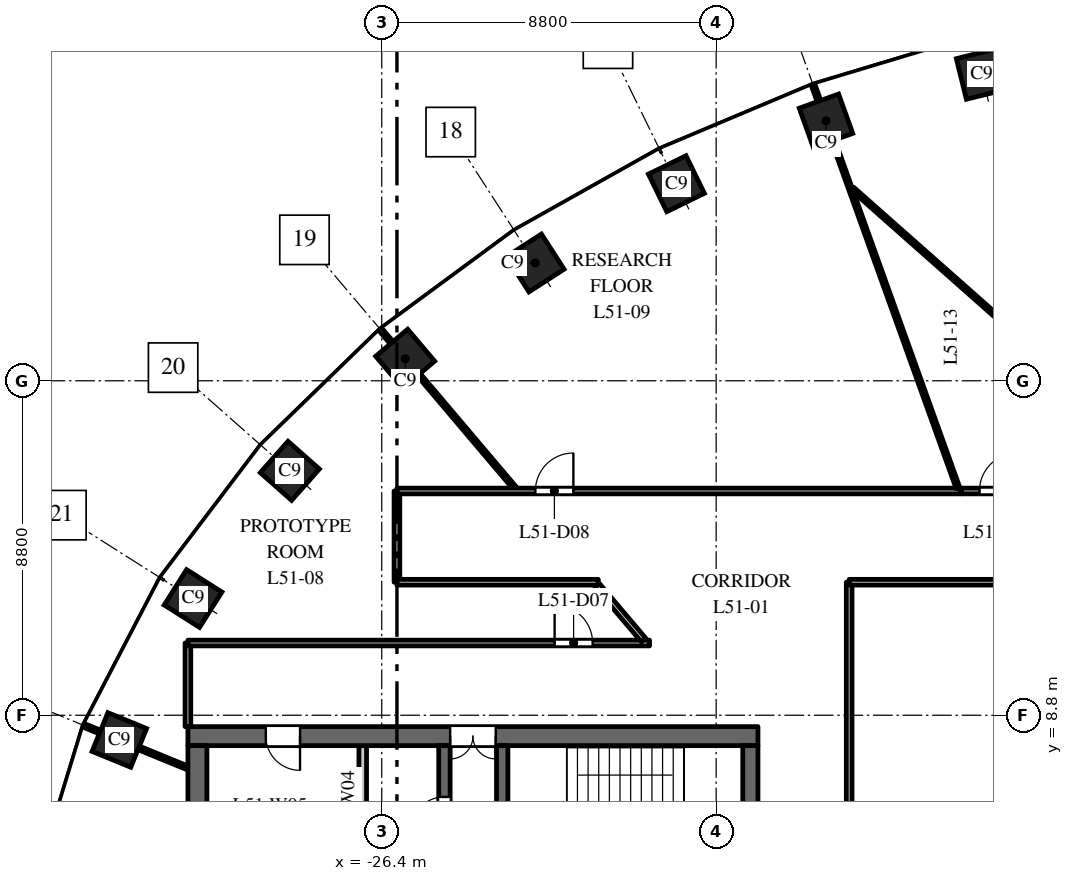
"""IFC4 building model, lengths in metres.
Left out: names, types, materials, properties, quantities, classifications, styles, units other than length and angle.
Written with IfcOpenShell. Run it as: python <this file> out.ifc"""

import sys

from ifc_helpers import new_model, si_unit, direction, frame, frame_2d, origin, origin_2d, place, context, subcontext, project, spatial, rectangle, extrude, element, fill, save


model = new_model("IFC4")
c1 = context("Model", 3, precision=1e-05, world=origin(), true_north=direction((0.0, 1.0)))
c2 = subcontext(c1, "Body", "Model", "MODEL_VIEW")
j1 = project(units=[si_unit("LENGTHUNIT", "METRE"), si_unit("PLANEANGLEUNIT", "RADIAN")], contexts=[c1])
p1 = place(None, origin())
s1 = spatial("IfcSite", under=j1, at=p1, CompositionType="ELEMENT")
p2 = place(p1, origin())
s2 = spatial("IfcBuilding", under=s1, at=p2, CompositionType="ELEMENT")
p3 = place(p2, frame((0.0, 0.0, 245.5)))
s3 = spatial("IfcBuildingStorey", under=s2, at=p3, CompositionType="ELEMENT", Elevation=245.5)
for number, where, z_axis, x_axis in (
    (1, (-10.613, 25.674, 0.0), (0.0, 0.0, 1.0), (-0.971, -0.24, 0.0)),
    (2, (-14.709, 24.441, 0.0), (0.0, 0.0, 1.0), (-0.941, -0.338, 0.0)),
    (3, (-18.646, 22.785, 0.0), (0.0, 0.0, 1.0), (-0.898, -0.439, 0.0)),
    (4, (-22.362, 20.7, 0.0), (0.0, 0.0, 1.0), (-0.84, -0.542, 0.0)),
    (5, (-25.783, 18.18, 0.0), (0.0, 0.0, 1.0), (-0.763, -0.646, 0.0)),
    (6, (-28.819, 15.23, 0.0), (0.0, 0.0, 1.0), (-0.663, -0.749, 0.0)),
    (7, (-31.365, 11.871, 0.0), (0.0, 0.0, 1.0), (-0.535, -0.845, 0.0)),
    (8, (-33.305, 8.149, 0.0), (0.0, 0.0, 1.0), (-0.379, -0.925, 0.0)),
):
    element("IfcColumn", number, at=place(p3, frame(where, z_axis=z_axis, x_axis=x_axis)), inside=s3, PredefinedType="COLUMN", context=c2, shape_type="SweptSolid", body=[
        extrude(rectangle(XDim=1.1, YDim=1.1, at=origin_2d()), origin(), (0.0, 0.0, 1.0), 4.0),
    ])
p4 = place(p3, frame((-16.5, 8.25, 0.0), z_axis=(0.0, 0.0, 1.0), x_axis=(-1.0, 0.0, 0.0)))
e9 = element("IfcWall", 9, at=p4, inside=s3, PredefinedType="SHEAR", context=c2, shape_type="SweptSolid", body=[
    extrude(rectangle(XDim=15.0, YDim=0.5, at=frame_2d((7.5, 0.0))), origin(), (0.0, 0.0, 1.0), 3.7),
])
p5 = place(p4, frame((6.9, 0.0, 0.0)))
e10 = element("IfcOpeningElement", 10, at=p5, cuts=e9, PredefinedType="OPENING", context=c2, shape_type="SweptSolid", body=[
    extrude(rectangle(XDim=1.2, YDim=2.1, at=frame_2d((0.6, 1.05))), frame((0.0, 0.26, 0.0), z_axis=(0.0, -1.0, 0.0), x_axis=(1.0, 0.0, 0.0)), (0.0, 0.0, 1.0), 0.52),
])
p6 = place(p4, frame((12.05, 0.0, 0.0)))
e11 = element("IfcOpeningElement", 11, at=p6, cuts=e9, PredefinedType="OPENING", context=c2, shape_type="SweptSolid", body=[
    extrude(rectangle(XDim=0.9, YDim=2.1, at=frame_2d((0.45, 1.05))), frame((0.0, 0.26, 0.0), z_axis=(0.0, -1.0, 0.0), x_axis=(1.0, 0.0, 0.0)), (0.0, 0.0, 1.0), 0.52),
])
p7 = place(p3, frame((-24.75, -8.0, 0.0), z_axis=(0.0, 0.0, 1.0), x_axis=(0.0, 1.0, 0.0)))
e12 = element("IfcWall", 12, at=p7, inside=s3, PredefinedType="SHEAR", context=c2, shape_type="SweptSolid", body=[
    extrude(rectangle(XDim=16.0, YDim=0.3, at=frame_2d((8.0, 0.0))), origin(), (0.0, 0.0, 1.0), 3.7),
])
p8 = place(p7, frame((4.425, 0.0, 0.0)))
e13 = element("IfcOpeningElement", 13, at=p8, cuts=e12, PredefinedType="OPENING", context=c2, shape_type="SweptSolid", body=[
    extrude(rectangle(XDim=1.1, YDim=2.1, at=frame_2d((0.55, 1.05))), frame((0.0, 0.16, 0.0), z_axis=(0.0, -1.0, 0.0), x_axis=(1.0, 0.0, 0.0)), (0.0, 0.0, 1.0), 0.32),
])
p9 = place(p7, frame((7.45, 0.0, 0.0)))
e14 = element("IfcOpeningElement", 14, at=p9, cuts=e12, PredefinedType="OPENING", context=c2, shape_type="SweptSolid", body=[
    extrude(rectangle(XDim=1.1, YDim=2.1, at=frame_2d((0.55, 1.05))), frame((0.0, 0.16, 0.0), z_axis=(0.0, -1.0, 0.0), x_axis=(1.0, 0.0, 0.0)), (0.0, 0.0, 1.0), 0.32),
])
p10 = place(p7, frame((10.475, 0.0, 0.0)))
e15 = element("IfcOpeningElement", 15, at=p10, cuts=e12, PredefinedType="OPENING", context=c2, shape_type="SweptSolid", body=[
    extrude(rectangle(XDim=1.1, YDim=2.1, at=frame_2d((0.55, 1.05))), frame((0.0, 0.16, 0.0), z_axis=(0.0, -1.0, 0.0), x_axis=(1.0, 0.0, 0.0)), (0.0, 0.0, 1.0), 0.32),
])
p11 = place(p7, frame((13.75, 0.0, 0.0)))
e16 = element("IfcOpeningElement", 16, at=p11, cuts=e12, PredefinedType="OPENING", context=c2, shape_type="SweptSolid", body=[
    extrude(rectangle(XDim=0.9, YDim=2.1, at=frame_2d((0.45, 1.05))), frame((0.0, 0.16, 0.0), z_axis=(0.0, -1.0, 0.0), x_axis=(1.0, 0.0, 0.0)), (0.0, 0.0, 1.0), 0.32),
])
p12 = place(p7, frame((1.35, 0.0, 0.0)))
e17 = element("IfcOpeningElement", 17, at=p12, cuts=e12, PredefinedType="OPENING", context=c2, shape_type="SweptSolid", body=[
    extrude(rectangle(XDim=0.9, YDim=2.1, at=frame_2d((0.45, 1.05))), frame((0.0, 0.16, 0.0), z_axis=(0.0, -1.0, 0.0), x_axis=(1.0, 0.0, 0.0)), (0.0, 0.0, 1.0), 0.32),
])
p13 = place(p3, frame((-16.7, -8.0, 0.0), z_axis=(0.0, 0.0, 1.0), x_axis=(0.0, 1.0, 0.0)))
e18 = element("IfcWall", 18, at=p13, inside=s3, PredefinedType="SHEAR", context=c2, shape_type="SweptSolid", body=[
    extrude(rectangle(XDim=16.0, YDim=0.4, at=frame_2d((8.0, 0.0))), origin(), (0.0, 0.0, 1.0), 3.7),
])
p14 = place(p3, frame((-31.25, -8.0, 0.0), z_axis=(0.0, 0.0, 1.0), x_axis=(0.0, 1.0, 0.0)))
e19 = element("IfcWall", 19, at=p14, inside=s3, PredefinedType="SHEAR", context=c2, shape_type="SweptSolid", body=[
    extrude(rectangle(XDim=16.0, YDim=0.5, at=frame_2d((8.0, 0.0))), origin(), (0.0, 0.0, 1.0), 3.7),
])
p15 = place(p3, frame((-26.9, 4.75, 0.0), z_axis=(0.0, 0.0, 1.0), x_axis=(0.0, 1.0, 0.0)))
e20 = element("IfcWall", 20, at=p15, inside=s3, PredefinedType="PARTITIONING", context=c2, shape_type="SweptSolid", body=[
    extrude(rectangle(XDim=3.25, YDim=0.2, at=frame_2d((1.625, 0.0))), origin(), (0.0, 0.0, 1.0), 3.7),
])
p16 = place(p3, frame((-23.23, 2.25, 0.0), z_axis=(0.0, 0.0, 1.0), x_axis=(0.0, 1.0, 0.0)))
e21 = element("IfcWall", 21, at=p16, inside=s3, PredefinedType="SHEAR", context=c2, shape_type="SweptSolid", body=[
    extrude(rectangle(XDim=5.75, YDim=0.3, at=frame_2d((2.875, 0.0))), origin(), (0.0, 0.0, 1.0), 3.7),
])
p17 = place(p16, frame((0.6, 0.0, 0.0)))
e22 = element("IfcOpeningElement", 22, at=p17, cuts=e21, PredefinedType="OPENING", context=c2, shape_type="SweptSolid", body=[
    extrude(rectangle(XDim=1.0, YDim=2.1, at=frame_2d((0.5, 1.05))), frame((0.0, 0.16, 0.0), z_axis=(0.0, -1.0, 0.0), x_axis=(1.0, 0.0, 0.0)), (0.0, 0.0, 1.0), 0.32),
])
p18 = place(p3, frame((-34.234, 8.53, 0.0), z_axis=(0.0, 0.0, 1.0), x_axis=(0.925344112436, -0.379128307542, 0.0)))
e23 = element("IfcWall", 23, at=p18, inside=s3, PredefinedType="PARTITIONING", context=c2, shape_type="SweptSolid", body=[
    extrude(rectangle(XDim=2.954, YDim=0.1, at=frame_2d((1.477, 0.0))), origin(), (0.0, 0.0, 1.0), 3.0),
])
p19 = place(p3, frame((-31.5, 8.5, 0.0), z_axis=(0.0, 0.0, 1.0), x_axis=(0.0, 1.0, 0.0)))
e24 = element("IfcWall", 24, at=p19, inside=s3, PredefinedType="PARTITIONING", context=c2, shape_type="SweptSolid", body=[
    extrude(rectangle(XDim=2.2, YDim=0.15, at=frame_2d((1.1, 0.0))), origin(), (0.0, 0.0, 1.0), 3.7),
])
p20 = place(p3, frame((-31.5, 10.7, 0.0), z_axis=(0.0, 0.0, 1.0), x_axis=(1.0, 0.0, 0.0)))
e25 = element("IfcWall", 25, at=p20, inside=s3, PredefinedType="PARTITIONING", context=c2, shape_type="SweptSolid", body=[
    extrude(rectangle(XDim=12.147, YDim=0.15, at=frame_2d((6.073, 0.0))), origin(), (0.0, 0.0, 1.0), 3.1),
])
p21 = place(p20, frame((9.649, 0.0, 0.0)))
e26 = element("IfcOpeningElement", 26, at=p21, cuts=e25, PredefinedType="OPENING", context=c2, shape_type="SweptSolid", body=[
    extrude(rectangle(XDim=1.0, YDim=2.1, at=frame_2d((0.5, 1.05))), frame((0.0, 0.085, 0.0), z_axis=(0.0, -1.0, 0.0), x_axis=(1.0, 0.0, 0.0)), (0.0, 0.0, 1.0), 0.17),
])
p22 = place(p3, frame((-26.43, 18.945, 0.0), z_axis=(0.0, 0.0, 1.0), x_axis=(0.646381008665, -0.763014804337, 0.0)))
e27 = element("IfcWall", 27, at=p22, inside=s3, PredefinedType="PARTITIONING", context=c2, shape_type="SweptSolid", body=[
    extrude(rectangle(XDim=5.461, YDim=0.1, at=frame_2d((2.73, 0.0))), origin(), (0.0, 0.0, 1.0), 3.7),
])
p23 = place(p3, frame((-26.0, 12.3, 0.0), z_axis=(0.0, 0.0, 1.0), x_axis=(0.0, 1.0, 0.0)))
e28 = element("IfcWall", 28, at=p23, inside=s3, PredefinedType="PARTITIONING", context=c2, shape_type="SweptSolid", body=[
    extrude(rectangle(XDim=2.4, YDim=0.15, at=frame_2d((1.2, 0.0))), origin(), (0.0, 0.0, 1.0), 3.7),
])
p24 = place(p3, frame((-26.0, 12.3, 0.0), z_axis=(0.0, 0.0, 1.0), x_axis=(1.0, 0.0, 0.0)))
e29 = element("IfcWall", 29, at=p24, inside=s3, PredefinedType="PARTITIONING", context=c2, shape_type="SweptSolid", body=[
    extrude(rectangle(XDim=5.298, YDim=0.15, at=frame_2d((2.649, 0.0))), origin(), (0.0, 0.0, 1.0), 3.7),
])
p25 = place(p3, frame((-26.0, 14.7, 0.0), z_axis=(0.0, 0.0, 1.0), x_axis=(1.0, 0.0, 0.0)))
e30 = element("IfcWall", 30, at=p25, inside=s3, PredefinedType="PARTITIONING", context=c2, shape_type="SweptSolid", body=[
    extrude(rectangle(XDim=14.834, YDim=0.15, at=frame_2d((7.417, 0.0))), origin(), (0.0, 0.0, 1.0), 2.75),
])
p26 = place(p25, frame((3.643, 0.0, 0.0)))
e31 = element("IfcOpeningElement", 31, at=p26, cuts=e30, PredefinedType="OPENING", context=c2, shape_type="SweptSolid", body=[
    extrude(rectangle(XDim=1.0, YDim=2.1, at=frame_2d((0.5, 1.05))), frame((0.0, 0.085, 0.0), z_axis=(0.0, -1.0, 0.0), x_axis=(1.0, 0.0, 0.0)), (0.0, 0.0, 1.0), 0.17),
])
p27 = place(p3, frame((-20.734, 12.222, 0.0), z_axis=(0.0, 0.0, 1.0), x_axis=(0.646306563739, -0.763077863437, 0.0)))
e32 = element("IfcWall", 32, at=p27, inside=s3, PredefinedType="PARTITIONING", context=c2, shape_type="SweptSolid", body=[
    extrude(rectangle(XDim=1.892, YDim=0.15, at=frame_2d((0.946, 0.0))), origin(), (0.0, 0.0, 1.0), 3.7),
])
p28 = place(p3, frame((-15.048, 25.383, 0.0), z_axis=(0.0, 0.0, 1.0), x_axis=(0.338188533117, -0.941078379344, 0.0)))
e33 = element("IfcWall", 33, at=p28, inside=s3, PredefinedType="PARTITIONING", context=c2, shape_type="SweptSolid", body=[
    extrude(rectangle(XDim=11.269, YDim=0.1, at=frame_2d((5.635, 0.0))), origin(), (0.0, 0.0, 1.0), 3.0),
])
p29 = place(p3, frame((-14.1, -12.3, 0.0), z_axis=(0.0, 0.0, 1.0), x_axis=(0.0, 1.0, 0.0)))
e34 = element("IfcWall", 34, at=p29, inside=s3, PredefinedType="PARTITIONING", context=c2, shape_type="SweptSolid", body=[
    extrude(rectangle(XDim=24.6, YDim=0.15, at=frame_2d((12.3, 0.0))), origin(), (0.0, 0.0, 1.0), 2.75),
])
p30 = place(p29, frame((0.65, 0.0, 0.0)))
e35 = element("IfcOpeningElement", 35, at=p30, cuts=e34, PredefinedType="OPENING", context=c2, shape_type="SweptSolid", body=[
    extrude(rectangle(XDim=1.0, YDim=2.1, at=frame_2d((0.5, 1.05))), frame((0.0, 0.085, 0.0), z_axis=(0.0, -1.0, 0.0), x_axis=(1.0, 0.0, 0.0)), (0.0, 0.0, 1.0), 0.17),
])
p31 = place(p3, frame((-14.1, 12.3, 0.0), z_axis=(0.0, 0.0, 1.0), x_axis=(1.0, 0.0, 0.0)))
e36 = element("IfcWall", 36, at=p31, inside=s3, PredefinedType="PARTITIONING", context=c2, shape_type="SweptSolid", body=[
    extrude(rectangle(XDim=28.2, YDim=0.15, at=frame_2d((14.1, 0.0))), origin(), (0.0, 0.0, 1.0), 2.85),
])
p32 = place(p31, frame((10.52, 0.0, 0.0)))
e37 = element("IfcOpeningElement", 37, at=p32, cuts=e36, PredefinedType="OPENING", context=c2, shape_type="SweptSolid", body=[
    extrude(rectangle(XDim=1.0, YDim=2.1, at=frame_2d((0.5, 1.05))), frame((0.0, 0.085, 0.0), z_axis=(0.0, -1.0, 0.0), x_axis=(1.0, 0.0, 0.0)), (0.0, 0.0, 1.0), 0.17),
])
p33 = place(p31, frame((15.22, 0.0, 0.0)))
e38 = element("IfcOpeningElement", 38, at=p33, cuts=e36, PredefinedType="OPENING", context=c2, shape_type="SweptSolid", body=[
    extrude(rectangle(XDim=1.0, YDim=2.1, at=frame_2d((0.5, 1.05))), frame((0.0, 0.085, 0.0), z_axis=(0.0, -1.0, 0.0), x_axis=(1.0, 0.0, 0.0)), (0.0, 0.0, 1.0), 0.17),
])
p34 = place(p31, frame((22.42, 0.0, 0.0)))
e39 = element("IfcOpeningElement", 39, at=p34, cuts=e36, PredefinedType="OPENING", context=c2, shape_type="SweptSolid", body=[
    extrude(rectangle(XDim=1.0, YDim=2.1, at=frame_2d((0.5, 1.05))), frame((0.0, 0.085, 0.0), z_axis=(0.0, -1.0, 0.0), x_axis=(1.0, 0.0, 0.0)), (0.0, 0.0, 1.0), 0.17),
])
p35 = place(p3, frame((-14.014, 22.654, 0.0), z_axis=(0.0, 0.0, 1.0), x_axis=(0.749061235459, -0.66250076644, 0.0)))
e40 = element("IfcWall", 40, at=p35, inside=s3, PredefinedType="PARTITIONING", context=c2, shape_type="SweptSolid", body=[
    extrude(rectangle(XDim=11.888, YDim=0.1, at=frame_2d((5.944, 0.0))), origin(), (0.0, 0.0, 1.0), 2.85),
])
p36 = place(p3, frame((-11.154, 14.7, 0.0), z_axis=(0.0, 0.0, 1.0), x_axis=(1.0, 0.0, 0.0)))
e41 = element("IfcWall", 41, at=p36, inside=s3, PredefinedType="PARTITIONING", context=c2, shape_type="SweptSolid", body=[
    extrude(rectangle(XDim=10.835, YDim=0.15, at=frame_2d((5.417, 0.0))), origin(), (0.0, 0.0, 1.0), 2.85),
])
p37 = place(p36, frame((9.185, 0.0, 0.0)))
e42 = element("IfcOpeningElement", 42, at=p37, cuts=e41, PredefinedType="OPENING", context=c2, shape_type="SweptSolid", body=[
    extrude(rectangle(XDim=1.0, YDim=2.1, at=frame_2d((0.5, 1.05))), frame((0.0, 0.085, 0.0), z_axis=(0.0, -1.0, 0.0), x_axis=(1.0, 0.0, 0.0)), (0.0, 0.0, 1.0), 0.17),
])
p38 = place(p36, frame((0.483, 0.0, 0.0)))
e43 = element("IfcOpeningElement", 43, at=p38, cuts=e41, PredefinedType="OPENING", context=c2, shape_type="SweptSolid", body=[
    extrude(rectangle(XDim=1.0, YDim=2.1, at=frame_2d((0.5, 1.05))), frame((0.0, 0.085, 0.0), z_axis=(0.0, -1.0, 0.0), x_axis=(1.0, 0.0, 0.0)), (0.0, 0.0, 1.0), 0.17),
])
p39 = place(p5, origin())
e44 = element("IfcDoor", 44, at=p39, inside=s3, OperationType="DOUBLE_DOOR_DOUBLE_SWING", PredefinedType="DOOR", context=c2, shape_type="SweptSolid", body=[
    extrude(rectangle(XDim=1.2, YDim=2.1, at=frame_2d((0.6, 1.05))), frame((0.0, 0.025, 0.0), z_axis=(0.0, -1.0, 0.0), x_axis=(1.0, 0.0, 0.0)), (0.0, 0.0, 1.0), 0.05),
])
fill(e10, e44)
p40 = place(p11, origin())
e45 = element("IfcDoor", 45, at=p40, inside=s3, OperationType="SINGLE_SWING_RIGHT", PredefinedType="DOOR", context=c2, shape_type="SweptSolid", body=[
    extrude(rectangle(XDim=0.9, YDim=2.1, at=frame_2d((0.45, 1.05))), frame((0.0, 0.025, 0.0), z_axis=(0.0, -1.0, 0.0), x_axis=(1.0, 0.0, 0.0)), (0.0, 0.0, 1.0), 0.05),
])
fill(e16, e45)
p41 = place(p6, origin())
e46 = element("IfcDoor", 46, at=p41, inside=s3, OperationType="SINGLE_SWING_RIGHT", PredefinedType="DOOR", context=c2, shape_type="SweptSolid", body=[
    extrude(rectangle(XDim=0.9, YDim=2.1, at=frame_2d((0.45, 1.05))), frame((0.0, 0.025, 0.0), z_axis=(0.0, -1.0, 0.0), x_axis=(1.0, 0.0, 0.0)), (0.0, 0.0, 1.0), 0.05),
])
fill(e11, e46)
p42 = place(p21, origin())
e47 = element("IfcDoor", 47, at=p42, inside=s3, OperationType="SINGLE_SWING_LEFT", PredefinedType="DOOR", context=c2, shape_type="SweptSolid", body=[
    extrude(rectangle(XDim=1.0, YDim=2.1, at=frame_2d((0.5, 1.05))), frame((0.0, 0.025, 0.0), z_axis=(0.0, -1.0, 0.0), x_axis=(1.0, 0.0, 0.0)), (0.0, 0.0, 1.0), 0.05),
])
fill(e26, e47)
p43 = place(p26, origin())
e48 = element("IfcDoor", 48, at=p43, inside=s3, OperationType="SINGLE_SWING_RIGHT", PredefinedType="DOOR", context=c2, shape_type="SweptSolid", body=[
    extrude(rectangle(XDim=1.0, YDim=2.1, at=frame_2d((0.5, 1.05))), frame((0.0, 0.025, 0.0), z_axis=(0.0, -1.0, 0.0), x_axis=(1.0, 0.0, 0.0)), (0.0, 0.0, 1.0), 0.05),
])
fill(e31, e48)
p44 = place(p38, origin())
e49 = element("IfcDoor", 49, at=p44, inside=s3, OperationType="SINGLE_SWING_RIGHT", PredefinedType="DOOR", context=c2, shape_type="SweptSolid", body=[
    extrude(rectangle(XDim=1.0, YDim=2.1, at=frame_2d((0.5, 1.05))), frame((0.0, 0.025, 0.0), z_axis=(0.0, -1.0, 0.0), x_axis=(1.0, 0.0, 0.0)), (0.0, 0.0, 1.0), 0.05),
])
fill(e43, e49)
save(model, sys.argv[1])
